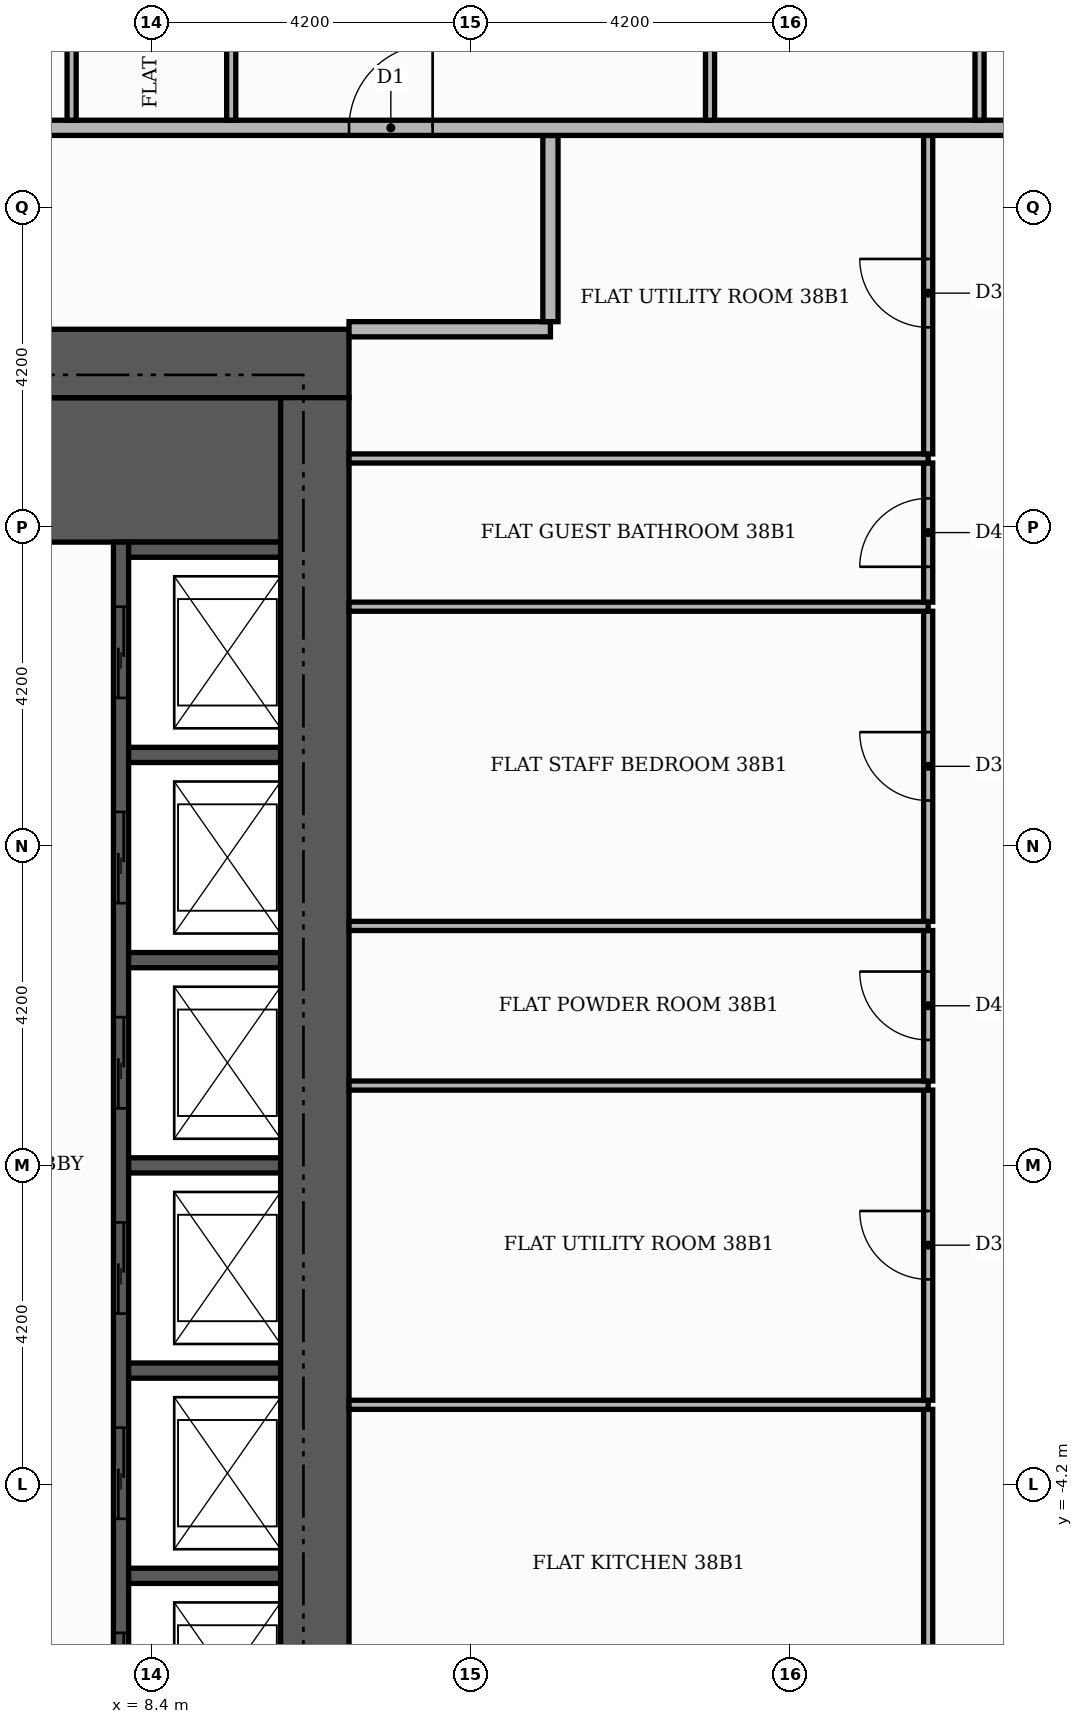
"""IFC4 building model, lengths in metres.
Left out: names, types, materials, properties, quantities, classifications, styles, units other than length and angle.
Written with IfcOpenShell. Run it as: python <this file> out.ifc"""

import sys

from ifc_helpers import new_model, si_unit, direction, frame, frame_2d, origin, place, context, subcontext, project, spatial, rectangle, extrude, element, fill, save


model = new_model("IFC4")
c1 = context("Model", 3, precision=1e-05, world=origin(), true_north=direction((0.0, 1.0)))
c2 = subcontext(c1, "Body", "Model", "MODEL_VIEW")
j1 = project(units=[si_unit("LENGTHUNIT", "METRE"), si_unit("PLANEANGLEUNIT", "RADIAN")], contexts=[c1])
p1 = place(None, origin())
s1 = spatial("IfcSite", under=j1, at=p1, CompositionType="ELEMENT")
p2 = place(p1, origin())
s2 = spatial("IfcBuilding", under=s1, at=p2, CompositionType="ELEMENT")
p3 = place(p2, frame((0.0, 0.0, 161.1)))
s3 = spatial("IfcBuildingStorey", under=s2, at=p3, CompositionType="ELEMENT", Elevation=161.1)
p4 = place(p3, frame((5.5, 9.15, 0.0), z_axis=(0.0, 0.0, 1.0), x_axis=(1.0, 0.0, 0.0)))
e1 = element("IfcWall", 1, at=p4, inside=s3, PredefinedType="SHEAR", context=c2, shape_type="SweptSolid", body=[
    extrude(rectangle(XDim=4.6, YDim=1.9, at=frame_2d((2.3, 0.0))), origin(), (0.0, 0.0, 1.0), 3.48),
])
p5 = place(p3, frame((8.0, -8.2, 0.0), z_axis=(0.0, 0.0, 1.0), x_axis=(0.0, 1.0, 0.0)))
e2 = element("IfcWall", 2, at=p5, inside=s3, PredefinedType="SHEAR", context=c2, shape_type="SweptSolid", body=[
    extrude(rectangle(XDim=16.4, YDim=0.2, at=frame_2d((8.2, 0.0))), origin(), (0.0, 0.0, 1.0), 3.48),
])
p6 = place(p5, frame((0.85, 0.0, 0.0)))
e3 = element("IfcOpeningElement", 3, at=p6, cuts=e2, PredefinedType="OPENING", context=c2, shape_type="SweptSolid", body=[
    extrude(rectangle(XDim=1.2, YDim=2.1, at=frame_2d((0.6, 1.05))), frame((0.0, 0.11, 0.0), z_axis=(0.0, -1.0, 0.0), x_axis=(1.0, 0.0, 0.0)), (0.0, 0.0, 1.0), 0.22),
])
p7 = place(p5, frame((3.55, 0.0, 0.0)))
e4 = element("IfcOpeningElement", 4, at=p7, cuts=e2, PredefinedType="OPENING", context=c2, shape_type="SweptSolid", body=[
    extrude(rectangle(XDim=1.2, YDim=2.1, at=frame_2d((0.6, 1.05))), frame((0.0, 0.11, 0.0), z_axis=(0.0, -1.0, 0.0), x_axis=(1.0, 0.0, 0.0)), (0.0, 0.0, 1.0), 0.22),
])
p8 = place(p5, frame((6.25, 0.0, 0.0)))
e5 = element("IfcOpeningElement", 5, at=p8, cuts=e2, PredefinedType="OPENING", context=c2, shape_type="SweptSolid", body=[
    extrude(rectangle(XDim=1.2, YDim=2.1, at=frame_2d((0.6, 1.05))), frame((0.0, 0.11, 0.0), z_axis=(0.0, -1.0, 0.0), x_axis=(1.0, 0.0, 0.0)), (0.0, 0.0, 1.0), 0.22),
])
p9 = place(p5, frame((8.95, 0.0, 0.0)))
e6 = element("IfcOpeningElement", 6, at=p9, cuts=e2, PredefinedType="OPENING", context=c2, shape_type="SweptSolid", body=[
    extrude(rectangle(XDim=1.2, YDim=2.1, at=frame_2d((0.6, 1.05))), frame((0.0, 0.11, 0.0), z_axis=(0.0, -1.0, 0.0), x_axis=(1.0, 0.0, 0.0)), (0.0, 0.0, 1.0), 0.22),
])
p10 = place(p5, frame((11.65, 0.0, 0.0)))
e7 = element("IfcOpeningElement", 7, at=p10, cuts=e2, PredefinedType="OPENING", context=c2, shape_type="SweptSolid", body=[
    extrude(rectangle(XDim=1.2, YDim=2.1, at=frame_2d((0.6, 1.05))), frame((0.0, 0.11, 0.0), z_axis=(0.0, -1.0, 0.0), x_axis=(1.0, 0.0, 0.0)), (0.0, 0.0, 1.0), 0.22),
])
p11 = place(p5, frame((14.35, 0.0, 0.0)))
e8 = element("IfcOpeningElement", 8, at=p11, cuts=e2, PredefinedType="OPENING", context=c2, shape_type="SweptSolid", body=[
    extrude(rectangle(XDim=1.2, YDim=2.1, at=frame_2d((0.6, 1.05))), frame((0.0, 0.11, 0.0), z_axis=(0.0, -1.0, 0.0), x_axis=(1.0, 0.0, 0.0)), (0.0, 0.0, 1.0), 0.22),
])
for number, where, z_axis, x_axis in (
    (9, (8.1, -5.4, 0.0), (0.0, 0.0, 1.0), (1.0, 0.0, 0.0)),
    (10, (8.1, -2.7, 0.0), (0.0, 0.0, 1.0), (1.0, 0.0, 0.0)),
    (11, (8.1, 0.0, 0.0), (0.0, 0.0, 1.0), (1.0, 0.0, 0.0)),
    (12, (8.1, 2.7, 0.0), (0.0, 0.0, 1.0), (1.0, 0.0, 0.0)),
    (13, (8.1, 5.4, 0.0), (0.0, 0.0, 1.0), (1.0, 0.0, 0.0)),
    (14, (8.1, 8.1, 0.0), (0.0, 0.0, 1.0), (1.0, 0.0, 0.0)),
):
    element("IfcWall", number, at=place(p3, frame(where, z_axis=z_axis, x_axis=x_axis)), inside=s3, PredefinedType="SHEAR", context=c2, shape_type="SweptSolid", body=[
        extrude(rectangle(XDim=2.0, YDim=0.2, at=frame_2d((1.0, 0.0))), origin(), (0.0, 0.0, 1.0), 3.48),
    ])
p12 = place(p3, frame((-11.0, 10.55, 0.0), z_axis=(0.0, 0.0, 1.0), x_axis=(1.0, 0.0, 0.0)))
e15 = element("IfcWall", 15, at=p12, inside=s3, PredefinedType="SHEAR", context=c2, shape_type="SweptSolid", body=[
    extrude(rectangle(XDim=22.0, YDim=0.9, at=frame_2d((11.0, 0.0))), origin(), (0.0, 0.0, 1.0), 3.48),
])
p13 = place(p12, frame((13.3, 0.0, 0.0)))
e16 = element("IfcOpeningElement", 16, at=p13, cuts=e15, PredefinedType="OPENING", context=c2, shape_type="SweptSolid", body=[
    extrude(rectangle(XDim=1.8, YDim=2.2, at=frame_2d((0.9, 1.1))), frame((0.0, 0.46, 0.0), z_axis=(0.0, -1.0, 0.0), x_axis=(1.0, 0.0, 0.0)), (0.0, 0.0, 1.0), 0.92),
])
p14 = place(p3, frame((10.55, -10.1, 0.0), z_axis=(0.0, 0.0, 1.0), x_axis=(0.0, 1.0, 0.0)))
e17 = element("IfcWall", 17, at=p14, inside=s3, PredefinedType="SHEAR", context=c2, shape_type="SweptSolid", body=[
    extrude(rectangle(XDim=20.2, YDim=0.9, at=frame_2d((10.1, 0.0))), origin(), (0.0, 0.0, 1.0), 3.48),
])
p15 = place(p3, frame((18.62, -7.29, 0.0), z_axis=(0.0, 0.0, 1.0), x_axis=(0.0, 1.0, 0.0)))
e18 = element("IfcWall", 18, at=p15, inside=s3, PredefinedType="PARTITIONING", context=c2, shape_type="SweptSolid", body=[
    extrude(rectangle(XDim=4.08, YDim=0.12, at=frame_2d((2.04, 0.0))), origin(), (0.0, 0.0, 1.0), 3.48),
])
p16 = place(p3, frame((11.0, -3.15, 0.0), z_axis=(0.0, 0.0, 1.0), x_axis=(1.0, 0.0, 0.0)))
e19 = element("IfcWall", 19, at=p16, inside=s3, PredefinedType="PARTITIONING", context=c2, shape_type="SweptSolid", body=[
    extrude(rectangle(XDim=7.62, YDim=0.12, at=frame_2d((3.81, 0.0))), origin(), (0.0, 0.0, 1.0), 3.48),
])
p17 = place(p3, frame((18.62, -3.09, 0.0), z_axis=(0.0, 0.0, 1.0), x_axis=(0.0, 1.0, 0.0)))
e20 = element("IfcWall", 20, at=p17, inside=s3, PredefinedType="PARTITIONING", context=c2, shape_type="SweptSolid", body=[
    extrude(rectangle(XDim=4.08, YDim=0.12, at=frame_2d((2.04, 0.0))), origin(), (0.0, 0.0, 1.0), 3.48),
])
p18 = place(p17, frame((1.59, 0.0, 0.0)))
e21 = element("IfcOpeningElement", 21, at=p18, cuts=e20, PredefinedType="OPENING", context=c2, shape_type="SweptSolid", body=[
    extrude(rectangle(XDim=0.9, YDim=2.1, at=frame_2d((0.45, 1.05))), frame((0.0, 0.07, 0.0), z_axis=(0.0, -1.0, 0.0), x_axis=(1.0, 0.0, 0.0)), (0.0, 0.0, 1.0), 0.14),
])
p19 = place(p3, frame((11.0, 1.05, 0.0), z_axis=(0.0, 0.0, 1.0), x_axis=(1.0, 0.0, 0.0)))
e22 = element("IfcWall", 22, at=p19, inside=s3, PredefinedType="PARTITIONING", context=c2, shape_type="SweptSolid", body=[
    extrude(rectangle(XDim=7.62, YDim=0.12, at=frame_2d((3.81, 0.0))), origin(), (0.0, 0.0, 1.0), 3.48),
])
p20 = place(p3, frame((18.62, 1.11, 0.0), z_axis=(0.0, 0.0, 1.0), x_axis=(0.0, 1.0, 0.0)))
e23 = element("IfcWall", 23, at=p20, inside=s3, PredefinedType="PARTITIONING", context=c2, shape_type="SweptSolid", body=[
    extrude(rectangle(XDim=1.98, YDim=0.12, at=frame_2d((0.99, 0.0))), origin(), (0.0, 0.0, 1.0), 3.48),
])
p21 = place(p20, frame((0.54, 0.0, 0.0)))
e24 = element("IfcOpeningElement", 24, at=p21, cuts=e23, PredefinedType="OPENING", context=c2, shape_type="SweptSolid", body=[
    extrude(rectangle(XDim=0.9, YDim=2.1, at=frame_2d((0.45, 1.05))), frame((0.0, 0.07, 0.0), z_axis=(0.0, -1.0, 0.0), x_axis=(1.0, 0.0, 0.0)), (0.0, 0.0, 1.0), 0.14),
])
p22 = place(p3, frame((11.0, 3.15, 0.0), z_axis=(0.0, 0.0, 1.0), x_axis=(1.0, 0.0, 0.0)))
e25 = element("IfcWall", 25, at=p22, inside=s3, PredefinedType="PARTITIONING", context=c2, shape_type="SweptSolid", body=[
    extrude(rectangle(XDim=7.62, YDim=0.12, at=frame_2d((3.81, 0.0))), origin(), (0.0, 0.0, 1.0), 3.48),
])
p23 = place(p3, frame((18.62, 3.21, 0.0), z_axis=(0.0, 0.0, 1.0), x_axis=(0.0, 1.0, 0.0)))
e26 = element("IfcWall", 26, at=p23, inside=s3, PredefinedType="PARTITIONING", context=c2, shape_type="SweptSolid", body=[
    extrude(rectangle(XDim=4.08, YDim=0.12, at=frame_2d((2.04, 0.0))), origin(), (0.0, 0.0, 1.0), 3.48),
])
p24 = place(p23, frame((1.59, 0.0, 0.0)))
e27 = element("IfcOpeningElement", 27, at=p24, cuts=e26, PredefinedType="OPENING", context=c2, shape_type="SweptSolid", body=[
    extrude(rectangle(XDim=0.9, YDim=2.1, at=frame_2d((0.45, 1.05))), frame((0.0, 0.07, 0.0), z_axis=(0.0, -1.0, 0.0), x_axis=(1.0, 0.0, 0.0)), (0.0, 0.0, 1.0), 0.14),
])
p25 = place(p3, frame((11.0, 7.35, 0.0), z_axis=(0.0, 0.0, 1.0), x_axis=(1.0, 0.0, 0.0)))
e28 = element("IfcWall", 28, at=p25, inside=s3, PredefinedType="PARTITIONING", context=c2, shape_type="SweptSolid", body=[
    extrude(rectangle(XDim=7.62, YDim=0.12, at=frame_2d((3.81, 0.0))), origin(), (0.0, 0.0, 1.0), 3.48),
])
p26 = place(p3, frame((18.62, 7.41, 0.0), z_axis=(0.0, 0.0, 1.0), x_axis=(0.0, 1.0, 0.0)))
e29 = element("IfcWall", 29, at=p26, inside=s3, PredefinedType="PARTITIONING", context=c2, shape_type="SweptSolid", body=[
    extrude(rectangle(XDim=1.83, YDim=0.12, at=frame_2d((0.915, 0.0))), origin(), (0.0, 0.0, 1.0), 3.48),
])
p27 = place(p26, frame((0.465, 0.0, 0.0)))
e30 = element("IfcOpeningElement", 30, at=p27, cuts=e29, PredefinedType="OPENING", context=c2, shape_type="SweptSolid", body=[
    extrude(rectangle(XDim=0.9, YDim=2.1, at=frame_2d((0.45, 1.05))), frame((0.0, 0.07, 0.0), z_axis=(0.0, -1.0, 0.0), x_axis=(1.0, 0.0, 0.0)), (0.0, 0.0, 1.0), 0.14),
])
p28 = place(p3, frame((11.0, 9.3, 0.0), z_axis=(0.0, 0.0, 1.0), x_axis=(1.0, 0.0, 0.0)))
e31 = element("IfcWall", 31, at=p28, inside=s3, PredefinedType="PARTITIONING", context=c2, shape_type="SweptSolid", body=[
    extrude(rectangle(XDim=7.62, YDim=0.12, at=frame_2d((3.81, 0.0))), origin(), (0.0, 0.0, 1.0), 3.48),
])
p29 = place(p3, frame((18.62, 9.36, 0.0), z_axis=(0.0, 0.0, 1.0), x_axis=(0.0, 1.0, 0.0)))
e32 = element("IfcWall", 32, at=p29, inside=s3, PredefinedType="PARTITIONING", context=c2, shape_type="SweptSolid", body=[
    extrude(rectangle(XDim=4.19, YDim=0.12, at=frame_2d((2.095, 0.0))), origin(), (0.0, 0.0, 1.0), 3.48),
])
p30 = place(p29, frame((1.665, 0.0, 0.0)))
e33 = element("IfcOpeningElement", 33, at=p30, cuts=e32, PredefinedType="OPENING", context=c2, shape_type="SweptSolid", body=[
    extrude(rectangle(XDim=0.9, YDim=2.1, at=frame_2d((0.45, 1.05))), frame((0.0, 0.07, 0.0), z_axis=(0.0, -1.0, 0.0), x_axis=(1.0, 0.0, 0.0)), (0.0, 0.0, 1.0), 0.14),
])
p31 = place(p3, frame((11.0, 11.0, 0.0), z_axis=(0.0, 0.0, 1.0), x_axis=(1.0, 0.0, 0.0)))
e34 = element("IfcWall", 34, at=p31, inside=s3, PredefinedType="PARTITIONING", context=c2, shape_type="SweptSolid", body=[
    extrude(rectangle(XDim=2.65, YDim=0.2, at=frame_2d((1.325, 0.0))), origin(), (0.0, 0.0, 1.0), 3.48),
])
p32 = place(p3, frame((13.65, 11.1, 0.0), z_axis=(0.0, 0.0, 1.0), x_axis=(0.0, 1.0, 0.0)))
e35 = element("IfcWall", 35, at=p32, inside=s3, PredefinedType="PARTITIONING", context=c2, shape_type="SweptSolid", body=[
    extrude(rectangle(XDim=2.45, YDim=0.2, at=frame_2d((1.225, 0.0))), origin(), (0.0, 0.0, 1.0), 3.48),
])
p33 = place(p3, frame((-13.65, 13.65, 0.0), z_axis=(0.0, 0.0, 1.0), x_axis=(1.0, 0.0, 0.0)))
e36 = element("IfcWall", 36, at=p33, inside=s3, PredefinedType="PARTITIONING", context=c2, shape_type="SweptSolid", body=[
    extrude(rectangle(XDim=39.07, YDim=0.2, at=frame_2d((19.535, 0.0))), origin(), (0.0, 0.0, 1.0), 3.48),
])
p34 = place(p33, frame((24.65, 0.0, 0.0)))
e37 = element("IfcOpeningElement", 37, at=p34, cuts=e36, PredefinedType="OPENING", context=c2, shape_type="SweptSolid", body=[
    extrude(rectangle(XDim=1.1, YDim=2.4, at=frame_2d((0.55, 1.2))), frame((0.0, 0.11, 0.0), z_axis=(0.0, -1.0, 0.0), x_axis=(1.0, 0.0, 0.0)), (0.0, 0.0, 1.0), 0.22),
])
p35 = place(p33, frame((12.05, 0.0, 0.0)))
e38 = element("IfcOpeningElement", 38, at=p35, cuts=e36, PredefinedType="OPENING", context=c2, shape_type="SweptSolid", body=[
    extrude(rectangle(XDim=1.1, YDim=2.4, at=frame_2d((0.55, 1.2))), frame((0.0, 0.11, 0.0), z_axis=(0.0, -1.0, 0.0), x_axis=(1.0, 0.0, 0.0)), (0.0, 0.0, 1.0), 0.22),
])
p36 = place(p3, frame((7.35, 13.75, 0.0), z_axis=(0.0, 0.0, 1.0), x_axis=(0.0, 1.0, 0.0)))
e39 = element("IfcWall", 39, at=p36, inside=s3, PredefinedType="PARTITIONING", context=c2, shape_type="SweptSolid", body=[
    extrude(rectangle(XDim=4.51, YDim=0.12, at=frame_2d((2.255, 0.0))), origin(), (0.0, 0.0, 1.0), 3.48),
])
p37 = place(p3, frame((9.45, 13.75, 0.0), z_axis=(0.0, 0.0, 1.0), x_axis=(0.0, 1.0, 0.0)))
e40 = element("IfcWall", 40, at=p37, inside=s3, PredefinedType="PARTITIONING", context=c2, shape_type="SweptSolid", body=[
    extrude(rectangle(XDim=4.51, YDim=0.12, at=frame_2d((2.255, 0.0))), origin(), (0.0, 0.0, 1.0), 3.48),
])
p38 = place(p37, frame((1.785, 0.0, 0.0)))
e41 = element("IfcOpeningElement", 41, at=p38, cuts=e40, PredefinedType="OPENING", context=c2, shape_type="SweptSolid", body=[
    extrude(rectangle(XDim=0.9, YDim=2.1, at=frame_2d((0.45, 1.05))), frame((0.0, 0.07, 0.0), z_axis=(0.0, -1.0, 0.0), x_axis=(1.0, 0.0, 0.0)), (0.0, 0.0, 1.0), 0.14),
])
p39 = place(p3, frame((15.75, 13.75, 0.0), z_axis=(0.0, 0.0, 1.0), x_axis=(0.0, 1.0, 0.0)))
e42 = element("IfcWall", 42, at=p39, inside=s3, PredefinedType="PARTITIONING", context=c2, shape_type="SweptSolid", body=[
    extrude(rectangle(XDim=6.01, YDim=0.12, at=frame_2d((3.005, 0.0))), origin(), (0.0, 0.0, 1.0), 3.48),
])
p40 = place(p39, frame((2.485, 0.0, 0.0)))
e43 = element("IfcOpeningElement", 43, at=p40, cuts=e42, PredefinedType="OPENING", context=c2, shape_type="SweptSolid", body=[
    extrude(rectangle(XDim=1.0, YDim=2.1, at=frame_2d((0.5, 1.05))), frame((0.0, 0.07, 0.0), z_axis=(0.0, -1.0, 0.0), x_axis=(1.0, 0.0, 0.0)), (0.0, 0.0, 1.0), 0.14),
])
p41 = place(p3, frame((19.296, 13.75, 0.0), z_axis=(0.0, 0.0, 1.0), x_axis=(0.0, 1.0, 0.0)))
e44 = element("IfcWall", 44, at=p41, inside=s3, PredefinedType="PARTITIONING", context=c2, shape_type="SweptSolid", body=[
    extrude(rectangle(XDim=3.75, YDim=0.12, at=frame_2d((1.875, 0.0))), origin(), (0.0, 0.0, 1.0), 3.48),
])
p42 = place(p6, origin())
e45 = element("IfcDoor", 45, at=p42, inside=s3, OperationType="SLIDING_TO_LEFT", PredefinedType="DOOR", context=c2, shape_type="SweptSolid", body=[
    extrude(rectangle(XDim=1.2, YDim=2.1, at=frame_2d((0.6, 1.05))), frame((0.0, 0.025, 0.0), z_axis=(0.0, -1.0, 0.0), x_axis=(1.0, 0.0, 0.0)), (0.0, 0.0, 1.0), 0.05),
])
fill(e3, e45)
p43 = place(p7, origin())
e46 = element("IfcDoor", 46, at=p43, inside=s3, OperationType="SLIDING_TO_LEFT", PredefinedType="DOOR", context=c2, shape_type="SweptSolid", body=[
    extrude(rectangle(XDim=1.2, YDim=2.1, at=frame_2d((0.6, 1.05))), frame((0.0, 0.025, 0.0), z_axis=(0.0, -1.0, 0.0), x_axis=(1.0, 0.0, 0.0)), (0.0, 0.0, 1.0), 0.05),
])
fill(e4, e46)
p44 = place(p8, origin())
e47 = element("IfcDoor", 47, at=p44, inside=s3, OperationType="SLIDING_TO_LEFT", PredefinedType="DOOR", context=c2, shape_type="SweptSolid", body=[
    extrude(rectangle(XDim=1.2, YDim=2.1, at=frame_2d((0.6, 1.05))), frame((0.0, 0.025, 0.0), z_axis=(0.0, -1.0, 0.0), x_axis=(1.0, 0.0, 0.0)), (0.0, 0.0, 1.0), 0.05),
])
fill(e5, e47)
p45 = place(p9, origin())
e48 = element("IfcDoor", 48, at=p45, inside=s3, OperationType="SLIDING_TO_LEFT", PredefinedType="DOOR", context=c2, shape_type="SweptSolid", body=[
    extrude(rectangle(XDim=1.2, YDim=2.1, at=frame_2d((0.6, 1.05))), frame((0.0, 0.025, 0.0), z_axis=(0.0, -1.0, 0.0), x_axis=(1.0, 0.0, 0.0)), (0.0, 0.0, 1.0), 0.05),
])
fill(e6, e48)
p46 = place(p10, origin())
e49 = element("IfcDoor", 49, at=p46, inside=s3, OperationType="SLIDING_TO_LEFT", PredefinedType="DOOR", context=c2, shape_type="SweptSolid", body=[
    extrude(rectangle(XDim=1.2, YDim=2.1, at=frame_2d((0.6, 1.05))), frame((0.0, 0.025, 0.0), z_axis=(0.0, -1.0, 0.0), x_axis=(1.0, 0.0, 0.0)), (0.0, 0.0, 1.0), 0.05),
])
fill(e7, e49)
p47 = place(p11, origin())
e50 = element("IfcDoor", 50, at=p47, inside=s3, OperationType="SLIDING_TO_LEFT", PredefinedType="DOOR", context=c2, shape_type="SweptSolid", body=[
    extrude(rectangle(XDim=1.2, YDim=2.1, at=frame_2d((0.6, 1.05))), frame((0.0, 0.025, 0.0), z_axis=(0.0, -1.0, 0.0), x_axis=(1.0, 0.0, 0.0)), (0.0, 0.0, 1.0), 0.05),
])
fill(e8, e50)
p48 = place(p18, origin())
e51 = element("IfcDoor", 51, at=p48, inside=s3, OperationType="SINGLE_SWING_RIGHT", PredefinedType="DOOR", context=c2, shape_type="SweptSolid", body=[
    extrude(rectangle(XDim=0.9, YDim=2.1, at=frame_2d((0.45, 1.05))), frame((0.0, 0.025, 0.0), z_axis=(0.0, -1.0, 0.0), x_axis=(1.0, 0.0, 0.0)), (0.0, 0.0, 1.0), 0.05),
])
fill(e21, e51)
p49 = place(p21, origin())
e52 = element("IfcDoor", 52, at=p49, inside=s3, OperationType="SINGLE_SWING_RIGHT", PredefinedType="DOOR", context=c2, shape_type="SweptSolid", body=[
    extrude(rectangle(XDim=0.9, YDim=2.1, at=frame_2d((0.45, 1.05))), frame((0.0, 0.025, 0.0), z_axis=(0.0, -1.0, 0.0), x_axis=(1.0, 0.0, 0.0)), (0.0, 0.0, 1.0), 0.05),
])
fill(e24, e52)
p50 = place(p24, origin())
e53 = element("IfcDoor", 53, at=p50, inside=s3, OperationType="SINGLE_SWING_RIGHT", PredefinedType="DOOR", context=c2, shape_type="SweptSolid", body=[
    extrude(rectangle(XDim=0.9, YDim=2.1, at=frame_2d((0.45, 1.05))), frame((0.0, 0.025, 0.0), z_axis=(0.0, -1.0, 0.0), x_axis=(1.0, 0.0, 0.0)), (0.0, 0.0, 1.0), 0.05),
])
fill(e27, e53)
p51 = place(p27, origin())
e54 = element("IfcDoor", 54, at=p51, inside=s3, OperationType="SINGLE_SWING_LEFT", PredefinedType="DOOR", context=c2, shape_type="SweptSolid", body=[
    extrude(rectangle(XDim=0.9, YDim=2.1, at=frame_2d((0.45, 1.05))), frame((0.0, 0.025, 0.0), z_axis=(0.0, -1.0, 0.0), x_axis=(1.0, 0.0, 0.0)), (0.0, 0.0, 1.0), 0.05),
])
fill(e30, e54)
p52 = place(p30, origin())
e55 = element("IfcDoor", 55, at=p52, inside=s3, OperationType="SINGLE_SWING_RIGHT", PredefinedType="DOOR", context=c2, shape_type="SweptSolid", body=[
    extrude(rectangle(XDim=0.9, YDim=2.1, at=frame_2d((0.45, 1.05))), frame((0.0, 0.025, 0.0), z_axis=(0.0, -1.0, 0.0), x_axis=(1.0, 0.0, 0.0)), (0.0, 0.0, 1.0), 0.05),
])
fill(e33, e55)
p53 = place(p34, origin())
e56 = element("IfcDoor", 56, at=p53, inside=s3, OperationType="SINGLE_SWING_RIGHT", PredefinedType="DOOR", context=c2, shape_type="SweptSolid", body=[
    extrude(rectangle(XDim=1.1, YDim=2.4, at=frame_2d((0.55, 1.2))), frame((0.0, 0.025, 0.0), z_axis=(0.0, -1.0, 0.0), x_axis=(1.0, 0.0, 0.0)), (0.0, 0.0, 1.0), 0.05),
])
fill(e37, e56)
save(model, sys.argv[1])
